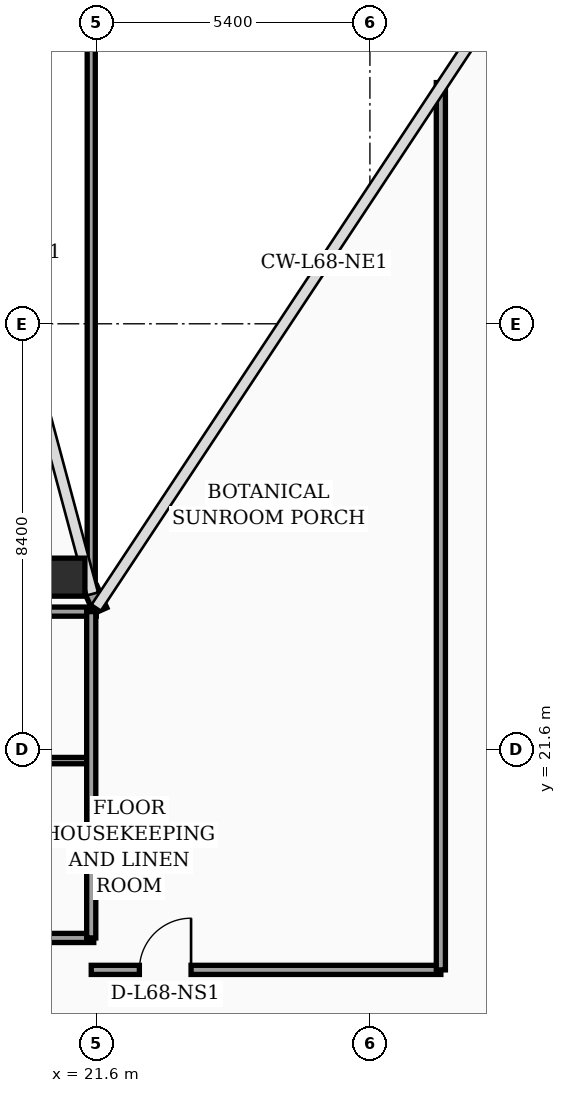
"""IFC4 building model, lengths in metres.
Left out: names, types, materials, properties, quantities, classifications, styles, units other than length and angle.
Written with IfcOpenShell. Run it as: python <this file> out.ifc"""

import sys

from ifc_helpers import new_model, si_unit, direction, frame, frame_2d, origin, origin_2d, place, context, subcontext, project, spatial, rectangle, hollow_rectangle, extrude, element, fill, save


model = new_model("IFC4")
c1 = context("Model", 3, precision=1e-05, world=origin(), true_north=direction((0.0, 1.0)))
c2 = subcontext(c1, "Body", "Model", "MODEL_VIEW")
j1 = project(units=[si_unit("LENGTHUNIT", "METRE"), si_unit("PLANEANGLEUNIT", "RADIAN")], contexts=[c1])
p1 = place(None, origin())
s1 = spatial("IfcSite", under=j1, at=p1, CompositionType="ELEMENT")
p2 = place(p1, origin())
s2 = spatial("IfcBuilding", under=s1, at=p2, CompositionType="ELEMENT")
p3 = place(p2, frame((0.0, 0.0, 274.9)))
s3 = spatial("IfcBuildingStorey", under=s2, at=p3, CompositionType="ELEMENT", Elevation=274.9)
p4 = place(p3, frame((21.0, 25.0, 0.0), z_axis=(0.0, 0.0, 1.0), x_axis=(1.0, 0.0, 0.0)))
e1 = element("IfcColumn", 1, at=p4, inside=s3, PredefinedType="COLUMN", context=c2, shape_type="SweptSolid", body=[
    extrude(hollow_rectangle(XDim=0.75, YDim=0.75, WallThickness=0.032, at=origin_2d()), origin(), (0.0, 0.0, 1.0), 3.56),
])
p5 = place(p3, frame((21.68, 24.34, 0.0), z_axis=(0.0, 0.0, 1.0), x_axis=(-0.40758134973, 0.913168901875, 0.0)))
e2 = element("IfcWall", 2, at=p5, inside=s3, PredefinedType="SOLIDWALL", context=c2, shape_type="SweptSolid", body=[
    extrude(rectangle(XDim=0.471, YDim=0.28, at=frame_2d((0.235, 0.0))), origin(), (0.0, 0.0, 1.0), 3.56),
])
p6 = place(p3, frame((17.65, 17.88, 0.0), z_axis=(0.0, 0.0, 1.0), x_axis=(1.0, 0.0, 0.0)))
e3 = element("IfcWall", 3, at=p6, inside=s3, PredefinedType="PARTITIONING", context=c2, shape_type="SweptSolid", body=[
    extrude(rectangle(XDim=3.9, YDim=0.18, at=frame_2d((1.95, 0.0))), origin(), (0.0, 0.0, 1.0), 3.56),
])
p7 = place(p3, frame((17.65, 21.38, 0.0), z_axis=(0.0, 0.0, 1.0), x_axis=(1.0, 0.0, 0.0)))
e4 = element("IfcWall", 4, at=p7, inside=s3, PredefinedType="PARTITIONING", context=c2, shape_type="SweptSolid", body=[
    extrude(rectangle(XDim=3.9, YDim=0.125, at=frame_2d((1.95, 0.0))), origin(), (0.0, 0.0, 1.0), 3.09),
])
p8 = place(p3, frame((17.65, 24.32, 0.0), z_axis=(0.0, 0.0, 1.0), x_axis=(1.0, 0.0, 0.0)))
e5 = element("IfcWall", 5, at=p8, inside=s3, PredefinedType="PARTITIONING", context=c2, shape_type="SweptSolid", body=[
    extrude(rectangle(XDim=3.95, YDim=0.18, at=frame_2d((1.975, 0.0))), origin(), (0.0, 0.0, 1.0), 3.56),
])
p9 = place(p3, frame((21.5, 17.88, 0.0), z_axis=(0.0, 0.0, 1.0), x_axis=(0.0, 1.0, 0.0)))
e6 = element("IfcWall", 6, at=p9, inside=s3, PredefinedType="PARTITIONING", context=c2, shape_type="SweptSolid", body=[
    extrude(rectangle(XDim=6.44, YDim=0.18, at=frame_2d((3.22, 0.0))), origin(), (0.0, 0.0, 1.0), 3.09),
])
p10 = place(p3, frame((21.5, 24.85, 0.0), z_axis=(0.0, 0.0, 1.0), x_axis=(0.0, 1.0, 0.0)))
e7 = element("IfcWall", 7, at=p10, inside=s3, PredefinedType="PARTITIONING", context=c2, shape_type="SweptSolid", body=[
    extrude(rectangle(XDim=13.05, YDim=0.16, at=frame_2d((6.525, 0.0))), origin(), (0.0, 0.0, 1.0), 2.99),
])
p11 = place(p3, frame((21.5, 17.25, 0.0), z_axis=(0.0, 0.0, 1.0), x_axis=(1.0, 0.0, 0.0)))
e8 = element("IfcWall", 8, at=p11, inside=s3, PredefinedType="PARTITIONING", context=c2, shape_type="SweptSolid", body=[
    extrude(rectangle(XDim=6.9, YDim=0.18, at=frame_2d((3.45, 0.0))), origin(), (0.0, 0.0, 1.0), 3.56),
])
p12 = place(p11, frame((0.95, 0.0, 0.0)))
e9 = element("IfcOpeningElement", 9, at=p12, cuts=e8, PredefinedType="OPENING", context=c2, shape_type="SweptSolid", body=[
    extrude(rectangle(XDim=1.02, YDim=2.2, at=frame_2d((0.51, 1.1))), frame((0.0, 0.1, 0.0), z_axis=(0.0, -1.0, 0.0), x_axis=(1.0, 0.0, 0.0)), (0.0, 0.0, 1.0), 0.2),
])
p13 = place(p3, frame((28.4, 17.25, 0.0), z_axis=(0.0, 0.0, 1.0), x_axis=(0.0, 1.0, 0.0)))
e10 = element("IfcWall", 10, at=p13, inside=s3, PredefinedType="PARTITIONING", context=c2, shape_type="SweptSolid", body=[
    extrude(rectangle(XDim=17.51, YDim=0.18, at=frame_2d((8.755, 0.0))), origin(), (0.0, 0.0, 1.0), 3.09),
])
p14 = place(p12, origin())
e11 = element("IfcDoor", 11, at=p14, inside=s3, OperationType="SINGLE_SWING_RIGHT", PredefinedType="DOOR", context=c2, shape_type="SweptSolid", body=[
    extrude(rectangle(XDim=1.02, YDim=2.2, at=frame_2d((0.51, 1.1))), frame((0.0, 0.025, 0.0), z_axis=(0.0, -1.0, 0.0), x_axis=(1.0, 0.0, 0.0)), (0.0, 0.0, 1.0), 0.05),
])
fill(e9, e11)
save(model, sys.argv[1])
